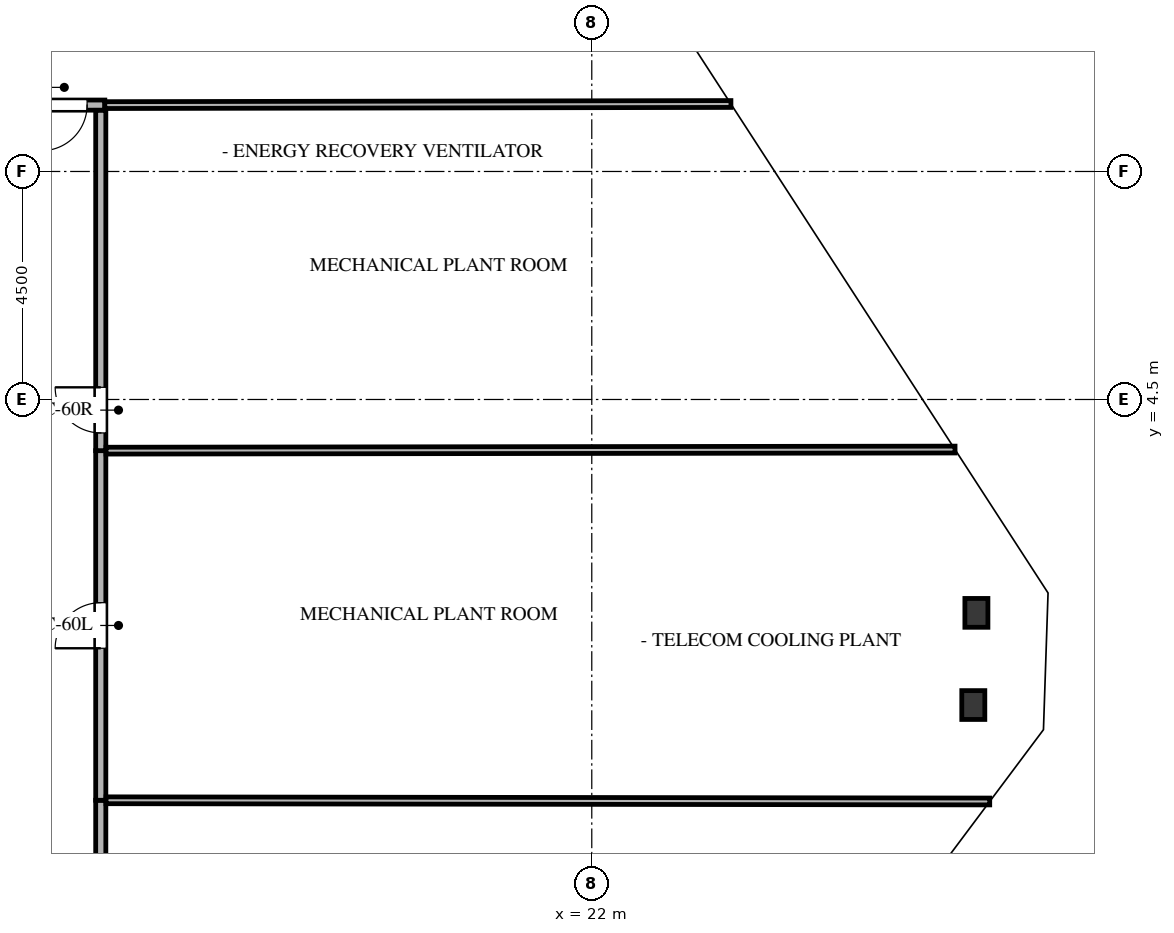
"""IFC4 building model, lengths in metres.
Left out: names, types, materials, properties, quantities, classifications, styles, units other than length and angle.
Written with IfcOpenShell. Run it as: python <this file> out.ifc"""

import sys

from ifc_helpers import new_model, si_unit, direction, frame, frame_2d, origin, origin_2d, place, context, subcontext, project, spatial, rectangle, i_section, extrude, source, transform, mapped, element, fill, save


model = new_model("IFC4")
c1 = context("Model", 3, precision=1e-05, world=origin(), true_north=direction((0.0, 1.0)))
c2 = subcontext(c1, "Body", "Model", "MODEL_VIEW")
j1 = project(units=[si_unit("LENGTHUNIT", "METRE"), si_unit("PLANEANGLEUNIT", "RADIAN")], contexts=[c1])
p1 = place(None, origin())
s1 = spatial("IfcSite", under=j1, at=p1, CompositionType="ELEMENT")
p2 = place(p1, origin())
s2 = spatial("IfcBuilding", under=s1, at=p2, CompositionType="ELEMENT")
p3 = place(p2, frame((0.0, 0.0, 10.4)))
s3 = spatial("IfcBuildingStorey", under=s2, at=p3, CompositionType="ELEMENT", Elevation=10.4)
m1 = source(origin(), c2, "Body", "SweptSolid", [
    extrude(i_section(OverallWidth=0.454, OverallDepth=0.569, WebThickness=0.078, FlangeThickness=0.125, FilletRadius=0.031, at=origin_2d()), origin(), (0.0, 0.0, 1.0), 5.23),
])
for number, where, z_axis, x_axis in (
    (1, (29.591, 0.289, -0.35), (0.0, 0.0, 1.0), (1.0, 0.0, 0.0)),
    (2, (29.529, -1.531, -0.35), (0.0, 0.0, 1.0), (1.0, 0.0, 0.0)),
):
    element("IfcColumn", number, at=place(p3, frame(where, z_axis=z_axis, x_axis=x_axis)), inside=s3, PredefinedType="COLUMN", context=c2, shape_type="MappedRepresentation", body=[
        mapped(m1, transform((0.0, 0.0, 0.0), x_axis=(1.0, 0.0, 0.0), y_axis=(0.0, 1.0, 0.0), z_axis=(0.0, 0.0, 1.0), scale=1.0)),
    ])
p4 = place(p3, frame((12.39, 10.31, 0.0), z_axis=(0.0, 0.0, 1.0), x_axis=(-1.0, 0.0, 0.0)))
e3 = element("IfcWall", 3, at=p4, inside=s3, PredefinedType="SOLIDWALL", context=c2, shape_type="SweptSolid", body=[
    extrude(rectangle(XDim=4.15, YDim=0.2, at=frame_2d((2.075, 0.0))), origin(), (0.0, 0.0, 1.0), 3.787),
])
p5 = place(p4, frame((0.35, 0.0, 0.0)))
e4 = element("IfcOpeningElement", 4, at=p5, cuts=e3, PredefinedType="OPENING", context=c2, shape_type="SweptSolid", body=[
    extrude(rectangle(XDim=0.9, YDim=2.05, at=frame_2d((0.45, 1.025))), frame((0.0, 0.11, 0.0), z_axis=(0.0, -1.0, 0.0), x_axis=(1.0, 0.0, 0.0)), (0.0, 0.0, 1.0), 0.22),
])
p6 = place(p3, frame((12.31, -10.206, 0.0), z_axis=(0.0, 0.0, 1.0), x_axis=(0.0, 1.0, 0.0)))
e5 = element("IfcWall", 5, at=p6, inside=s3, PredefinedType="SOLIDWALL", context=c2, shape_type="SweptSolid", body=[
    extrude(rectangle(XDim=6.796, YDim=0.2, at=frame_2d((3.398, 0.0))), origin(), (0.0, 0.0, 1.0), 3.787),
])
p7 = place(p6, frame((3.65, 0.0, 0.0)))
e6 = element("IfcOpeningElement", 6, at=p7, cuts=e5, PredefinedType="OPENING", context=c2, shape_type="SweptSolid", body=[
    extrude(rectangle(XDim=0.9, YDim=2.05, at=frame_2d((0.45, 1.025))), frame((0.0, 0.11, 0.0), z_axis=(0.0, -1.0, 0.0), x_axis=(1.0, 0.0, 0.0)), (0.0, 0.0, 1.0), 0.22),
])
p8 = place(p3, frame((12.31, -3.41, 0.0), z_axis=(0.0, 0.0, 1.0), x_axis=(0.0, 1.0, 0.0)))
e7 = element("IfcWall", 7, at=p8, inside=s3, PredefinedType="SOLIDWALL", context=c2, shape_type="SweptSolid", body=[
    extrude(rectangle(XDim=6.9, YDim=0.2, at=frame_2d((3.45, 0.0))), origin(), (0.0, 0.0, 1.0), 3.787),
])
p9 = place(p8, frame((3.0, 0.0, 0.0)))
e8 = element("IfcOpeningElement", 8, at=p9, cuts=e7, PredefinedType="OPENING", context=c2, shape_type="SweptSolid", body=[
    extrude(rectangle(XDim=0.9, YDim=2.05, at=frame_2d((0.45, 1.025))), frame((0.0, 0.11, 0.0), z_axis=(0.0, -1.0, 0.0), x_axis=(1.0, 0.0, 0.0)), (0.0, 0.0, 1.0), 0.22),
])
p10 = place(p3, frame((12.31, 3.49, 0.0), z_axis=(0.0, 0.0, 1.0), x_axis=(0.0, 1.0, 0.0)))
e9 = element("IfcWall", 9, at=p10, inside=s3, PredefinedType="SOLIDWALL", context=c2, shape_type="SweptSolid", body=[
    extrude(rectangle(XDim=6.716, YDim=0.2, at=frame_2d((3.358, 0.0))), origin(), (0.0, 0.0, 1.0), 4.865),
])
p11 = place(p10, frame((0.35, 0.0, 0.0)))
e10 = element("IfcOpeningElement", 10, at=p11, cuts=e9, PredefinedType="OPENING", context=c2, shape_type="SweptSolid", body=[
    extrude(rectangle(XDim=0.9, YDim=2.05, at=frame_2d((0.45, 1.025))), frame((0.0, 0.11, 0.0), z_axis=(0.0, -1.0, 0.0), x_axis=(1.0, 0.0, 0.0)), (0.0, 0.0, 1.0), 0.22),
])
p12 = place(p3, frame((24.746, 10.332, 0.0), z_axis=(0.0, 0.0, 1.0), x_axis=(-0.999998453823, -0.001758508277, 0.0)))
e11 = element("IfcWall", 11, at=p12, inside=s3, PredefinedType="PARTITIONING", context=c2, shape_type="SweptSolid", body=[
    extrude(rectangle(XDim=12.356, YDim=0.135, at=frame_2d((6.178, 0.0))), origin(), (0.0, 0.0, 1.0), 4.174),
])
p13 = place(p3, frame((12.414, -3.41, 0.0), z_axis=(0.0, 0.0, 1.0), x_axis=(0.999999078008, -0.001357933567, 0.0)))
e12 = element("IfcWall", 12, at=p13, inside=s3, PredefinedType="PARTITIONING", context=c2, shape_type="SweptSolid", body=[
    extrude(rectangle(XDim=17.439, YDim=0.135, at=frame_2d((8.72, 0.0))), origin(), (0.0, 0.0, 1.0), 3.787),
])
p14 = place(p3, frame((12.414, 3.49, 0.0), z_axis=(0.0, 0.0, 1.0), x_axis=(0.999999159095, 0.001296845678, 0.0)))
e13 = element("IfcWall", 13, at=p14, inside=s3, PredefinedType="PARTITIONING", context=c2, shape_type="SweptSolid", body=[
    extrude(rectangle(XDim=16.755, YDim=0.135, at=frame_2d((8.377, 0.0))), origin(), (0.0, 0.0, 1.0), 4.174),
])
m2 = source(origin(), c2, "Body", "SweptSolid", [
    extrude(rectangle(XDim=0.9, YDim=2.05, at=frame_2d((0.45, 1.025))), frame((0.0, 0.025, 0.0), z_axis=(0.0, -1.0, 0.0), x_axis=(1.0, 0.0, 0.0)), (0.0, 0.0, 1.0), 0.05),
])
p15 = place(p5, origin())
e14 = element("IfcDoor", 14, at=p15, inside=s3, OperationType="SINGLE_SWING_RIGHT", PredefinedType="DOOR", context=c2, shape_type="MappedRepresentation", body=[
    mapped(m2, transform((0.0, 0.0, 0.0), x_axis=(1.0, 0.0, 0.0), y_axis=(0.0, 1.0, 0.0), z_axis=(0.0, 0.0, 1.0), scale=1.0)),
])
fill(e4, e14)
m3 = source(origin(), c2, "Body", "SweptSolid", [
    extrude(rectangle(XDim=0.9, YDim=2.05, at=frame_2d((0.45, 1.025))), frame((0.0, 0.025, 0.0), z_axis=(0.0, -1.0, 0.0), x_axis=(1.0, 0.0, 0.0)), (0.0, 0.0, 1.0), 0.05),
])
p16 = place(p9, origin())
e15 = element("IfcDoor", 15, at=p16, inside=s3, OperationType="SINGLE_SWING_LEFT", PredefinedType="DOOR", context=c2, shape_type="MappedRepresentation", body=[
    mapped(m3, transform((0.0, 0.0, 0.0), x_axis=(1.0, 0.0, 0.0), y_axis=(0.0, 1.0, 0.0), z_axis=(0.0, 0.0, 1.0), scale=1.0)),
])
fill(e8, e15)
p17 = place(p11, origin())
e16 = element("IfcDoor", 16, at=p17, inside=s3, OperationType="SINGLE_SWING_RIGHT", PredefinedType="DOOR", context=c2, shape_type="MappedRepresentation", body=[
    mapped(m2, transform((0.0, 0.0, 0.0), x_axis=(1.0, 0.0, 0.0), y_axis=(0.0, 1.0, 0.0), z_axis=(0.0, 0.0, 1.0), scale=1.0)),
])
fill(e10, e16)
save(model, sys.argv[1])
